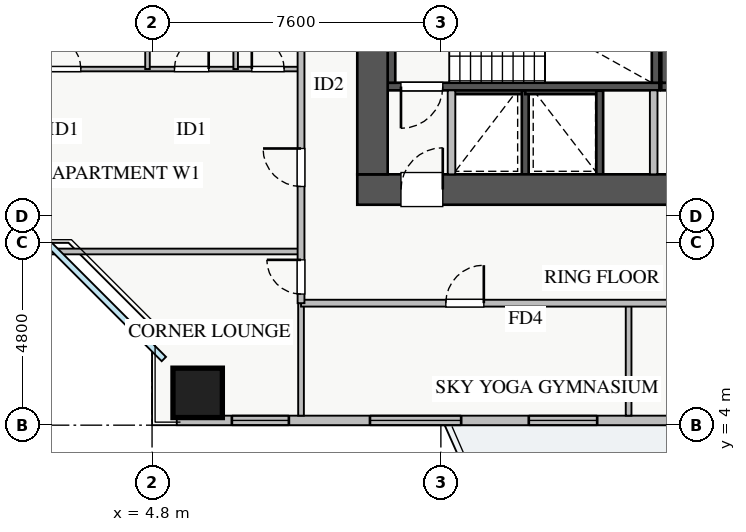
"""IFC4 building model, lengths in metres.
Left out: names, types, materials, properties, quantities, classifications, styles, units other than length and angle.
Written with IfcOpenShell. Run it as: python <this file> out.ifc"""

import sys

from ifc_helpers import new_model, si_unit, direction, frame, frame_2d, origin, origin_2d, place, context, subcontext, project, spatial, rectangle, extrude, source, transform, mapped, element, fill, save


model = new_model("IFC4")
c1 = context("Model", 3, precision=1e-05, world=origin(), true_north=direction((0.0, 1.0)))
c2 = subcontext(c1, "Body", "Model", "MODEL_VIEW")
j1 = project(units=[si_unit("LENGTHUNIT", "METRE"), si_unit("PLANEANGLEUNIT", "RADIAN")], contexts=[c1])
p1 = place(None, origin())
s1 = spatial("IfcSite", under=j1, at=p1, CompositionType="ELEMENT")
p2 = place(p1, origin())
s2 = spatial("IfcBuilding", under=s1, at=p2, CompositionType="ELEMENT")
p3 = place(p2, frame((0.0, 0.0, 89.25)))
s3 = spatial("IfcBuildingStorey", under=s2, at=p3, CompositionType="ELEMENT", Elevation=89.25)
p4 = place(p3, frame((12.68, 12.8, 0.0), z_axis=(0.0, 0.0, 1.0), x_axis=(1.0, 0.0, 0.0)))
e1 = element("IfcWall", 1, at=p4, inside=s3, PredefinedType="SHEAR", context=c2, shape_type="SweptSolid", body=[
    extrude(rectangle(XDim=1.94, YDim=0.18, at=frame_2d((0.97, 0.0))), origin(), (0.0, 0.0, 1.0), 3.03),
])
p5 = place(p3, frame((14.62, 10.6, 0.0), z_axis=(0.0, 0.0, 1.0), x_axis=(0.0, 1.0, 0.0)))
e2 = element("IfcWall", 2, at=p5, inside=s3, PredefinedType="SHEAR", context=c2, shape_type="SweptSolid", body=[
    extrude(rectangle(XDim=2.2, YDim=0.18, at=frame_2d((1.1, 0.0))), origin(), (0.0, 0.0, 1.0), 3.03),
])
p6 = place(p3, frame((14.62, 12.8, 0.0), z_axis=(0.0, 0.0, 1.0), x_axis=(1.0, 0.0, 0.0)))
e3 = element("IfcWall", 3, at=p6, inside=s3, PredefinedType="SHEAR", context=c2, shape_type="SweptSolid", body=[
    extrude(rectangle(XDim=1.96, YDim=0.18, at=frame_2d((0.98, 0.0))), origin(), (0.0, 0.0, 1.0), 3.03),
])
p7 = place(p3, frame((16.58, 10.6, 0.0), z_axis=(0.0, 0.0, 1.0), x_axis=(0.0, 1.0, 0.0)))
e4 = element("IfcWall", 4, at=p7, inside=s3, PredefinedType="SHEAR", context=c2, shape_type="SweptSolid", body=[
    extrude(rectangle(XDim=2.2, YDim=0.18, at=frame_2d((1.1, 0.0))), origin(), (0.0, 0.0, 1.0), 3.03),
])
p8 = place(p3, frame((11.0, 12.91, 0.0), z_axis=(0.0, 0.0, 1.0), x_axis=(1.0, 0.0, 0.0)))
e5 = element("IfcWall", 5, at=p8, inside=s3, PredefinedType="SHEAR", context=c2, shape_type="SweptSolid", body=[
    extrude(rectangle(XDim=7.15, YDim=0.2, at=frame_2d((3.575, 0.0))), origin(), (0.0, 0.0, 1.0), 3.25),
])
p9 = place(p8, frame((0.35, 0.0, 0.0)))
e6 = element("IfcOpeningElement", 6, at=p9, cuts=e5, PredefinedType="OPENING", context=c2, shape_type="SweptSolid", body=[
    extrude(rectangle(XDim=1.1, YDim=2.05, at=frame_2d((0.55, 1.025))), frame((0.0, 0.11, 0.0), z_axis=(0.0, -1.0, 0.0), x_axis=(1.0, 0.0, 0.0)), (0.0, 0.0, 1.0), 0.22),
])
for number, where, z_axis, x_axis in (
    (7, (11.1, 13.01, 0.0), (0.0, 0.0, 1.0), (0.0, 1.0, 0.0)),
    (8, (18.05, 13.01, 0.0), (0.0, 0.0, 1.0), (0.0, 1.0, 0.0)),
):
    element("IfcWall", number, at=place(p3, frame(where, z_axis=z_axis, x_axis=x_axis)), inside=s3, PredefinedType="SHEAR", context=c2, shape_type="SweptSolid", body=[
        extrude(rectangle(XDim=2.94, YDim=0.2, at=frame_2d((1.47, 0.0))), origin(), (0.0, 0.0, 1.0), 3.25),
    ])
p10 = place(p3, frame((18.2, 12.91, 0.0), z_axis=(0.0, 0.0, 1.0), x_axis=(1.0, 0.0, 0.0)))
e9 = element("IfcWall", 9, at=p10, inside=s3, PredefinedType="SHEAR", context=c2, shape_type="SweptSolid", body=[
    extrude(rectangle(XDim=7.15, YDim=0.2, at=frame_2d((3.575, 0.0))), origin(), (0.0, 0.0, 1.0), 3.25),
])
p11 = place(p10, frame((0.35, 0.0, 0.0)))
e10 = element("IfcOpeningElement", 10, at=p11, cuts=e9, PredefinedType="OPENING", context=c2, shape_type="SweptSolid", body=[
    extrude(rectangle(XDim=1.1, YDim=2.05, at=frame_2d((0.55, 1.025))), frame((0.0, 0.11, 0.0), z_axis=(0.0, -1.0, 0.0), x_axis=(1.0, 0.0, 0.0)), (0.0, 0.0, 1.0), 0.22),
])
p12 = place(p3, frame((18.3, 13.01, 0.0), z_axis=(0.0, 0.0, 1.0), x_axis=(0.0, 1.0, 0.0)))
e11 = element("IfcWall", 11, at=p12, inside=s3, PredefinedType="SHEAR", context=c2, shape_type="SweptSolid", body=[
    extrude(rectangle(XDim=2.94, YDim=0.2, at=frame_2d((1.47, 0.0))), origin(), (0.0, 0.0, 1.0), 3.25),
])
p13 = place(p3, frame((10.2, 10.2, 0.0), z_axis=(0.0, 0.0, 1.0), x_axis=(1.0, 0.0, 0.0)))
e12 = element("IfcWall", 12, at=p13, inside=s3, PredefinedType="SHEAR", context=c2, shape_type="SweptSolid", body=[
    extrude(rectangle(XDim=17.6, YDim=0.8, at=frame_2d((8.8, 0.0))), origin(), (0.0, 0.0, 1.0), 3.25),
])
p14 = place(p13, frame((1.15, 0.0, 0.0)))
e13 = element("IfcOpeningElement", 13, at=p14, cuts=e12, PredefinedType="OPENING", context=c2, shape_type="SweptSolid", body=[
    extrude(rectangle(XDim=1.1, YDim=2.05, at=frame_2d((0.55, 1.025))), frame((0.0, 0.41, 0.0), z_axis=(0.0, -1.0, 0.0), x_axis=(1.0, 0.0, 0.0)), (0.0, 0.0, 1.0), 0.82),
])
p15 = place(p13, frame((8.3, 0.0, 0.0)))
e14 = element("IfcOpeningElement", 14, at=p15, cuts=e12, PredefinedType="OPENING", context=c2, shape_type="SweptSolid", body=[
    extrude(rectangle(XDim=1.1, YDim=2.05, at=frame_2d((0.55, 1.025))), frame((0.0, 0.41, 0.0), z_axis=(0.0, -1.0, 0.0), x_axis=(1.0, 0.0, 0.0)), (0.0, 0.0, 1.0), 0.82),
])
p16 = place(p13, frame((10.05, 0.0, 0.0)))
e15 = element("IfcOpeningElement", 15, at=p16, cuts=e12, PredefinedType="OPENING", context=c2, shape_type="SweptSolid", body=[
    extrude(rectangle(XDim=1.1, YDim=2.05, at=frame_2d((0.55, 1.025))), frame((0.0, 0.41, 0.0), z_axis=(0.0, -1.0, 0.0), x_axis=(1.0, 0.0, 0.0)), (0.0, 0.0, 1.0), 0.82),
])
p17 = place(p13, frame((14.74, 0.0, 0.0)))
e16 = element("IfcOpeningElement", 16, at=p17, cuts=e12, PredefinedType="OPENING", context=c2, shape_type="SweptSolid", body=[
    extrude(rectangle(XDim=1.0, YDim=2.05, at=frame_2d((0.5, 1.025))), frame((0.0, 0.41, 0.0), z_axis=(0.0, -1.0, 0.0), x_axis=(1.0, 0.0, 0.0)), (0.0, 0.0, 1.0), 0.82),
])
p18 = place(p13, frame((12.585, 0.0, 0.0)))
e17 = element("IfcOpeningElement", 17, at=p18, cuts=e12, PredefinedType="OPENING", context=c2, shape_type="SweptSolid", body=[
    extrude(rectangle(XDim=1.0, YDim=2.05, at=frame_2d((0.5, 1.025))), frame((0.0, 0.41, 0.0), z_axis=(0.0, -1.0, 0.0), x_axis=(1.0, 0.0, 0.0)), (0.0, 0.0, 1.0), 0.82),
])
p19 = place(p3, frame((10.6, 10.6, 0.0), z_axis=(0.0, 0.0, 1.0), x_axis=(0.0, 1.0, 0.0)))
e18 = element("IfcWall", 18, at=p19, inside=s3, PredefinedType="SHEAR", context=c2, shape_type="SweptSolid", body=[
    extrude(rectangle(XDim=5.6, YDim=0.8, at=frame_2d((2.8, 0.0))), origin(), (0.0, 0.0, 1.0), 3.25),
])
m1 = source(origin(), c2, "Body", "SweptSolid", [
    extrude(rectangle(XDim=1.3, YDim=1.3, at=origin_2d()), origin(), (0.0, 0.0, 1.0), 3.25),
])
p20 = place(p3, frame((6.0, 4.85, 0.0), z_axis=(0.0, 0.0, 1.0), x_axis=(1.0, 0.0, 0.0)))
e19 = element("IfcColumn", 19, at=p20, inside=s3, PredefinedType="COLUMN", context=c2, shape_type="MappedRepresentation", body=[
    mapped(m1, transform((0.0, 0.0, 0.0), x_axis=(1.0, 0.0, 0.0), y_axis=(0.0, 1.0, 0.0), z_axis=(0.0, 0.0, 1.0), scale=1.0)),
])
p21 = place(p3, frame((5.45, 4.125, 0.0), z_axis=(0.0, 0.0, 1.0), x_axis=(1.0, 0.0, 0.0)))
e20 = element("IfcWall", 20, at=p21, inside=s3, PredefinedType="STANDARD", context=c2, shape_type="SweptSolid", body=[
    extrude(rectangle(XDim=27.1, YDim=0.25, at=frame_2d((13.55, 0.0))), origin(), (0.0, 0.0, 1.0), 2.57),
])
p22 = place(p21, frame((14.4, 0.0, 0.0)))
e21 = element("IfcOpeningElement", 21, at=p22, cuts=e20, PredefinedType="OPENING", context=c2, shape_type="SweptSolid", body=[
    extrude(rectangle(XDim=1.2, YDim=2.1, at=frame_2d((0.6, 1.05))), frame((0.0, 0.135, 0.0), z_axis=(0.0, -1.0, 0.0), x_axis=(1.0, 0.0, 0.0)), (0.0, 0.0, 1.0), 0.27),
])
p23 = place(p21, frame((1.45, 0.0, 0.9)))
e22 = element("IfcOpeningElement", 22, at=p23, cuts=e20, PredefinedType="OPENING", context=c2, shape_type="SweptSolid", body=[
    extrude(rectangle(XDim=1.5, YDim=1.5, at=frame_2d((0.75, 0.75))), frame((0.0, 0.135, 0.0), z_axis=(0.0, -1.0, 0.0), x_axis=(1.0, 0.0, 0.0)), (0.0, 0.0, 1.0), 0.27),
])
p24 = place(p21, frame((9.263, 0.0, 0.9)))
e23 = element("IfcOpeningElement", 23, at=p24, cuts=e20, PredefinedType="OPENING", context=c2, shape_type="SweptSolid", body=[
    extrude(rectangle(XDim=1.8, YDim=1.45, at=frame_2d((0.9, 0.725))), frame((0.0, 0.135, 0.0), z_axis=(0.0, -1.0, 0.0), x_axis=(1.0, 0.0, 0.0)), (0.0, 0.0, 1.0), 0.27),
])
p25 = place(p21, frame((16.188, 0.0, 0.9)))
e24 = element("IfcOpeningElement", 24, at=p25, cuts=e20, PredefinedType="OPENING", context=c2, shape_type="SweptSolid", body=[
    extrude(rectangle(XDim=1.5, YDim=1.45, at=frame_2d((0.75, 0.725))), frame((0.0, 0.135, 0.0), z_axis=(0.0, -1.0, 0.0), x_axis=(1.0, 0.0, 0.0)), (0.0, 0.0, 1.0), 0.27),
])
p26 = place(p21, frame((22.663, 0.0, 0.9)))
e25 = element("IfcOpeningElement", 25, at=p26, cuts=e20, PredefinedType="OPENING", context=c2, shape_type="SweptSolid", body=[
    extrude(rectangle(XDim=2.1, YDim=1.48, at=frame_2d((1.05, 0.74))), frame((0.0, 0.135, 0.0), z_axis=(0.0, -1.0, 0.0), x_axis=(1.0, 0.0, 0.0)), (0.0, 0.0, 1.0), 0.27),
])
p27 = place(p21, frame((5.084, 0.0, 0.9)))
e26 = element("IfcOpeningElement", 26, at=p27, cuts=e20, PredefinedType="OPENING", context=c2, shape_type="SweptSolid", body=[
    extrude(rectangle(XDim=2.4, YDim=1.5, at=frame_2d((1.2, 0.75))), frame((0.0, 0.135, 0.0), z_axis=(0.0, -1.0, 0.0), x_axis=(1.0, 0.0, 0.0)), (0.0, 0.0, 1.0), 0.27),
])
for number, where, z_axis, x_axis in (
    (27, (12.68, 10.6, 0.0), (0.0, 0.0, 1.0), (0.0, 1.0, 0.0)),
    (28, (18.0, 10.6, 0.0), (0.0, 0.0, 1.0), (0.0, 1.0, 0.0)),
):
    element("IfcWall", number, at=place(p3, frame(where, z_axis=z_axis, x_axis=x_axis)), inside=s3, PredefinedType="PARTITIONING", context=c2, shape_type="SweptSolid", body=[
        extrude(rectangle(XDim=2.21, YDim=0.2, at=frame_2d((1.105, 0.0))), origin(), (0.0, 0.0, 1.0), 3.03),
    ])
for number, where, z_axis, x_axis in (
    (29, (17.34, 4.25, 0.0), (0.0, 0.0, 1.0), (0.0, 1.0, 0.0)),
    (30, (8.72, 4.25, 0.0), (0.0, 0.0, 1.0), (0.0, 1.0, 0.0)),
):
    element("IfcWall", number, at=place(p3, frame(where, z_axis=z_axis, x_axis=x_axis)), inside=s3, PredefinedType="PARTITIONING", context=c2, shape_type="SweptSolid", body=[
        extrude(rectangle(XDim=2.96, YDim=0.15, at=frame_2d((1.48, 0.0))), origin(), (0.0, 0.0, 1.0), 3.03),
    ])
p28 = place(p3, frame((8.72, 7.21, 0.0), z_axis=(0.0, 0.0, 1.0), x_axis=(1.0, 0.0, 0.0)))
e31 = element("IfcWall", 31, at=p28, inside=s3, PredefinedType="PARTITIONING", context=c2, shape_type="SweptSolid", body=[
    extrude(rectangle(XDim=23.63, YDim=0.18, at=frame_2d((11.815, 0.0))), origin(), (0.0, 0.0, 1.0), 3.03),
])
p29 = place(p28, frame((3.81, 0.0, 0.0)))
e32 = element("IfcOpeningElement", 32, at=p29, cuts=e31, PredefinedType="OPENING", context=c2, shape_type="SweptSolid", body=[
    extrude(rectangle(XDim=1.0, YDim=2.05, at=frame_2d((0.5, 1.025))), frame((0.0, 0.1, 0.0), z_axis=(0.0, -1.0, 0.0), x_axis=(1.0, 0.0, 0.0)), (0.0, 0.0, 1.0), 0.2),
])
p30 = place(p28, frame((11.685, 0.0, 0.0)))
e33 = element("IfcOpeningElement", 33, at=p30, cuts=e31, PredefinedType="OPENING", context=c2, shape_type="SweptSolid", body=[
    extrude(rectangle(XDim=1.0, YDim=2.05, at=frame_2d((0.5, 1.025))), frame((0.0, 0.1, 0.0), z_axis=(0.0, -1.0, 0.0), x_axis=(1.0, 0.0, 0.0)), (0.0, 0.0, 1.0), 0.2),
])
p31 = place(p28, frame((19.19, 0.0, 0.0)))
e34 = element("IfcOpeningElement", 34, at=p31, cuts=e31, PredefinedType="OPENING", context=c2, shape_type="SweptSolid", body=[
    extrude(rectangle(XDim=1.0, YDim=2.05, at=frame_2d((0.5, 1.025))), frame((0.0, 0.1, 0.0), z_axis=(0.0, -1.0, 0.0), x_axis=(1.0, 0.0, 0.0)), (0.0, 0.0, 1.0), 0.2),
])
p32 = place(p3, frame((0.25, 8.57, 0.0), z_axis=(0.0, 0.0, 1.0), x_axis=(1.0, 0.0, 0.0)))
e35 = element("IfcWall", 35, at=p32, inside=s3, PredefinedType="PARTITIONING", context=c2, shape_type="SweptSolid", body=[
    extrude(rectangle(XDim=8.47, YDim=0.15, at=frame_2d((4.235, 0.0))), origin(), (0.0, 0.0, 1.0), 3.03),
])
p33 = place(p3, frame((0.25, 13.37, 0.0), z_axis=(0.0, 0.0, 1.0), x_axis=(1.0, 0.0, 0.0)))
e36 = element("IfcWall", 36, at=p33, inside=s3, PredefinedType="PLUMBINGWALL", context=c2, shape_type="SweptSolid", body=[
    extrude(rectangle(XDim=8.47, YDim=0.12, at=frame_2d((4.235, 0.0))), origin(), (0.0, 0.0, 1.0), 3.03),
])
p34 = place(p33, frame((1.775, 0.0, 0.0)))
e37 = element("IfcOpeningElement", 37, at=p34, cuts=e36, PredefinedType="OPENING", context=c2, shape_type="SweptSolid", body=[
    extrude(rectangle(XDim=0.9, YDim=2.05, at=frame_2d((0.45, 1.025))), frame((0.0, 0.07, 0.0), z_axis=(0.0, -1.0, 0.0), x_axis=(1.0, 0.0, 0.0)), (0.0, 0.0, 1.0), 0.14),
])
p35 = place(p33, frame((5.14, 0.0, 0.0)))
e38 = element("IfcOpeningElement", 38, at=p35, cuts=e36, PredefinedType="OPENING", context=c2, shape_type="SweptSolid", body=[
    extrude(rectangle(XDim=0.9, YDim=2.05, at=frame_2d((0.45, 1.025))), frame((0.0, 0.07, 0.0), z_axis=(0.0, -1.0, 0.0), x_axis=(1.0, 0.0, 0.0)), (0.0, 0.0, 1.0), 0.14),
])
p36 = place(p33, frame((7.175, 0.0, 0.0)))
e39 = element("IfcOpeningElement", 39, at=p36, cuts=e36, PredefinedType="OPENING", context=c2, shape_type="SweptSolid", body=[
    extrude(rectangle(XDim=0.85, YDim=2.05, at=frame_2d((0.425, 1.025))), frame((0.0, 0.07, 0.0), z_axis=(0.0, -1.0, 0.0), x_axis=(1.0, 0.0, 0.0)), (0.0, 0.0, 1.0), 0.14),
])
for number, where, z_axis, x_axis in (
    (40, (4.68, 13.37, 0.0), (0.0, 0.0, 1.0), (0.0, 1.0, 0.0)),
    (41, (7.0, 13.37, 0.0), (0.0, 0.0, 1.0), (0.0, 1.0, 0.0)),
):
    element("IfcWall", number, at=place(p3, frame(where, z_axis=z_axis, x_axis=x_axis)), inside=s3, PredefinedType="PLUMBINGWALL", context=c2, shape_type="SweptSolid", body=[
        extrude(rectangle(XDim=5.21, YDim=0.12, at=frame_2d((2.605, 0.0))), origin(), (0.0, 0.0, 1.0), 3.03),
    ])
p37 = place(p3, frame((8.72, 7.21, 0.0), z_axis=(0.0, 0.0, 1.0), x_axis=(0.0, 1.0, 0.0)))
e42 = element("IfcWall", 42, at=p37, inside=s3, PredefinedType="PARTITIONING", context=c2, shape_type="SweptSolid", body=[
    extrude(rectangle(XDim=31.23, YDim=0.18, at=frame_2d((15.615, 0.0))), origin(), (0.0, 0.0, 1.0), 3.03),
])
p38 = place(p37, frame((30.09, 0.0, 0.0)))
e43 = element("IfcOpeningElement", 43, at=p38, cuts=e42, PredefinedType="OPENING", context=c2, shape_type="SweptSolid", body=[
    extrude(rectangle(XDim=0.9, YDim=2.05, at=frame_2d((0.45, 1.025))), frame((0.0, 0.1, 0.0), z_axis=(0.0, -1.0, 0.0), x_axis=(1.0, 0.0, 0.0)), (0.0, 0.0, 1.0), 0.2),
])
p39 = place(p37, frame((0.24, 0.0, 0.0)))
e44 = element("IfcOpeningElement", 44, at=p39, cuts=e42, PredefinedType="OPENING", context=c2, shape_type="SweptSolid", body=[
    extrude(rectangle(XDim=0.9, YDim=2.05, at=frame_2d((0.45, 1.025))), frame((0.0, 0.1, 0.0), z_axis=(0.0, -1.0, 0.0), x_axis=(1.0, 0.0, 0.0)), (0.0, 0.0, 1.0), 0.2),
])
p40 = place(p37, frame((3.07, 0.0, 0.0)))
e45 = element("IfcOpeningElement", 45, at=p40, cuts=e42, PredefinedType="OPENING", context=c2, shape_type="SweptSolid", body=[
    extrude(rectangle(XDim=1.0, YDim=2.05, at=frame_2d((0.5, 1.025))), frame((0.0, 0.1, 0.0), z_axis=(0.0, -1.0, 0.0), x_axis=(1.0, 0.0, 0.0)), (0.0, 0.0, 1.0), 0.2),
])
p41 = place(p37, frame((15.37, 0.0, 0.0)))
e46 = element("IfcOpeningElement", 46, at=p41, cuts=e42, PredefinedType="OPENING", context=c2, shape_type="SweptSolid", body=[
    extrude(rectangle(XDim=1.0, YDim=2.05, at=frame_2d((0.5, 1.025))), frame((0.0, 0.1, 0.0), z_axis=(0.0, -1.0, 0.0), x_axis=(1.0, 0.0, 0.0)), (0.0, 0.0, 1.0), 0.2),
])
p42 = place(p37, frame((21.96, 0.0, 0.0)))
e47 = element("IfcOpeningElement", 47, at=p42, cuts=e42, PredefinedType="OPENING", context=c2, shape_type="SweptSolid", body=[
    extrude(rectangle(XDim=1.0, YDim=2.05, at=frame_2d((0.5, 1.025))), frame((0.0, 0.1, 0.0), z_axis=(0.0, -1.0, 0.0), x_axis=(1.0, 0.0, 0.0)), (0.0, 0.0, 1.0), 0.2),
])
m2 = source(origin(), c2, "Body", "SweptSolid", [
    extrude(rectangle(XDim=1.5, YDim=1.5, at=frame_2d((0.75, 0.75))), frame((0.0, 0.03, 0.0), z_axis=(0.0, -1.0, 0.0), x_axis=(1.0, 0.0, 0.0)), (0.0, 0.0, 1.0), 0.06),
])
p43 = place(p23, origin())
e48 = element("IfcWindow", 48, at=p43, inside=s3, PartitioningType="TRIPLE_PANEL_VERTICAL", PredefinedType="WINDOW", context=c2, shape_type="MappedRepresentation", body=[
    mapped(m2, transform((0.0, 0.0, 0.0), x_axis=(1.0, 0.0, 0.0), y_axis=(0.0, 1.0, 0.0), z_axis=(0.0, 0.0, 1.0), scale=1.0)),
])
fill(e22, e48)
m3 = source(origin(), c2, "Body", "SweptSolid", [
    extrude(rectangle(XDim=1.8, YDim=1.45, at=frame_2d((0.9, 0.725))), frame((0.0, 0.03, 0.0), z_axis=(0.0, -1.0, 0.0), x_axis=(1.0, 0.0, 0.0)), (0.0, 0.0, 1.0), 0.06),
])
p44 = place(p24, origin())
e49 = element("IfcWindow", 49, at=p44, inside=s3, PartitioningType="DOUBLE_PANEL_VERTICAL", PredefinedType="WINDOW", context=c2, shape_type="MappedRepresentation", body=[
    mapped(m3, transform((0.0, 0.0, 0.0), x_axis=(1.0, 0.0, 0.0), y_axis=(0.0, 1.0, 0.0), z_axis=(0.0, 0.0, 1.0), scale=1.0)),
])
fill(e23, e49)
m4 = source(origin(), c2, "Body", "SweptSolid", [
    extrude(rectangle(XDim=1.1, YDim=2.05, at=frame_2d((0.55, 1.025))), frame((0.0, 0.025, 0.0), z_axis=(0.0, -1.0, 0.0), x_axis=(1.0, 0.0, 0.0)), (0.0, 0.0, 1.0), 0.05),
])
p45 = place(p14, origin())
e50 = element("IfcDoor", 50, at=p45, inside=s3, OperationType="SINGLE_SWING_RIGHT", PredefinedType="DOOR", context=c2, shape_type="MappedRepresentation", body=[
    mapped(m4, transform((0.0, 0.0, 0.0), x_axis=(1.0, 0.0, 0.0), y_axis=(0.0, 1.0, 0.0), z_axis=(0.0, 0.0, 1.0), scale=1.0)),
])
fill(e13, e50)
p46 = place(p9, frame((1.1, 0.0, 0.0), z_axis=(0.0, 0.0, 1.0), x_axis=(-1.0, 0.0, 0.0)))
e51 = element("IfcDoor", 51, at=p46, inside=s3, OperationType="SINGLE_SWING_LEFT", PredefinedType="DOOR", context=c2, shape_type="MappedRepresentation", body=[
    mapped(m4, transform((0.0, 0.0, 0.0), x_axis=(1.0, 0.0, 0.0), y_axis=(0.0, 1.0, 0.0), z_axis=(0.0, 0.0, 1.0), scale=1.0)),
])
fill(e6, e51)
m5 = source(origin(), c2, "Body", "SweptSolid", [
    extrude(rectangle(XDim=1.0, YDim=2.05, at=frame_2d((0.5, 1.025))), frame((0.0, 0.025, 0.0), z_axis=(0.0, -1.0, 0.0), x_axis=(1.0, 0.0, 0.0)), (0.0, 0.0, 1.0), 0.05),
])
p47 = place(p29, origin())
e52 = element("IfcDoor", 52, at=p47, inside=s3, OperationType="SINGLE_SWING_RIGHT", PredefinedType="DOOR", context=c2, shape_type="MappedRepresentation", body=[
    mapped(m5, transform((0.0, 0.0, 0.0), x_axis=(1.0, 0.0, 0.0), y_axis=(0.0, 1.0, 0.0), z_axis=(0.0, 0.0, 1.0), scale=1.0)),
])
fill(e32, e52)
m6 = source(origin(), c2, "Body", "SweptSolid", [
    extrude(rectangle(XDim=0.9, YDim=2.05, at=frame_2d((0.45, 1.025))), frame((0.0, 0.025, 0.0), z_axis=(0.0, -1.0, 0.0), x_axis=(1.0, 0.0, 0.0)), (0.0, 0.0, 1.0), 0.05),
])
p48 = place(p34, origin())
e53 = element("IfcDoor", 53, at=p48, inside=s3, OperationType="SINGLE_SWING_LEFT", PredefinedType="DOOR", context=c2, shape_type="MappedRepresentation", body=[
    mapped(m6, transform((0.0, 0.0, 0.0), x_axis=(1.0, 0.0, 0.0), y_axis=(0.0, 1.0, 0.0), z_axis=(0.0, 0.0, 1.0), scale=1.0)),
])
fill(e37, e53)
p49 = place(p35, origin())
e54 = element("IfcDoor", 54, at=p49, inside=s3, OperationType="SINGLE_SWING_RIGHT", PredefinedType="DOOR", context=c2, shape_type="MappedRepresentation", body=[
    mapped(m6, transform((0.0, 0.0, 0.0), x_axis=(1.0, 0.0, 0.0), y_axis=(0.0, 1.0, 0.0), z_axis=(0.0, 0.0, 1.0), scale=1.0)),
])
fill(e38, e54)
m7 = source(origin(), c2, "Body", "SweptSolid", [
    extrude(rectangle(XDim=0.85, YDim=2.05, at=frame_2d((0.425, 1.025))), frame((0.0, 0.025, 0.0), z_axis=(0.0, -1.0, 0.0), x_axis=(1.0, 0.0, 0.0)), (0.0, 0.0, 1.0), 0.05),
])
p50 = place(p36, origin())
e55 = element("IfcDoor", 55, at=p50, inside=s3, OperationType="SINGLE_SWING_LEFT", PredefinedType="DOOR", context=c2, shape_type="MappedRepresentation", body=[
    mapped(m7, transform((0.0, 0.0, 0.0), x_axis=(1.0, 0.0, 0.0), y_axis=(0.0, 1.0, 0.0), z_axis=(0.0, 0.0, 1.0), scale=1.0)),
])
fill(e39, e55)
p51 = place(p39, origin())
e56 = element("IfcDoor", 56, at=p51, inside=s3, OperationType="SINGLE_SWING_RIGHT", PredefinedType="DOOR", context=c2, shape_type="MappedRepresentation", body=[
    mapped(m6, transform((0.0, 0.0, 0.0), x_axis=(1.0, 0.0, 0.0), y_axis=(0.0, 1.0, 0.0), z_axis=(0.0, 0.0, 1.0), scale=1.0)),
])
fill(e44, e56)
p52 = place(p40, origin())
e57 = element("IfcDoor", 57, at=p52, inside=s3, OperationType="SINGLE_SWING_RIGHT", PredefinedType="DOOR", context=c2, shape_type="MappedRepresentation", body=[
    mapped(m5, transform((0.0, 0.0, 0.0), x_axis=(1.0, 0.0, 0.0), y_axis=(0.0, 1.0, 0.0), z_axis=(0.0, 0.0, 1.0), scale=1.0)),
])
fill(e45, e57)
m8 = source(origin(), c2, "Body", "SweptSolid", [
    extrude(rectangle(XDim=2.4, YDim=1.5, at=frame_2d((1.2, 0.75))), frame((0.0, 0.03, 0.0), z_axis=(0.0, -1.0, 0.0), x_axis=(1.0, 0.0, 0.0)), (0.0, 0.0, 1.0), 0.06),
])
p53 = place(p27, origin())
e58 = element("IfcWindow", 58, at=p53, inside=s3, PartitioningType="TRIPLE_PANEL_VERTICAL", PredefinedType="WINDOW", context=c2, shape_type="MappedRepresentation", body=[
    mapped(m8, transform((0.0, 0.0, 0.0), x_axis=(1.0, 0.0, 0.0), y_axis=(0.0, 1.0, 0.0), z_axis=(0.0, 0.0, 1.0), scale=1.0)),
])
fill(e26, e58)
save(model, sys.argv[1])
